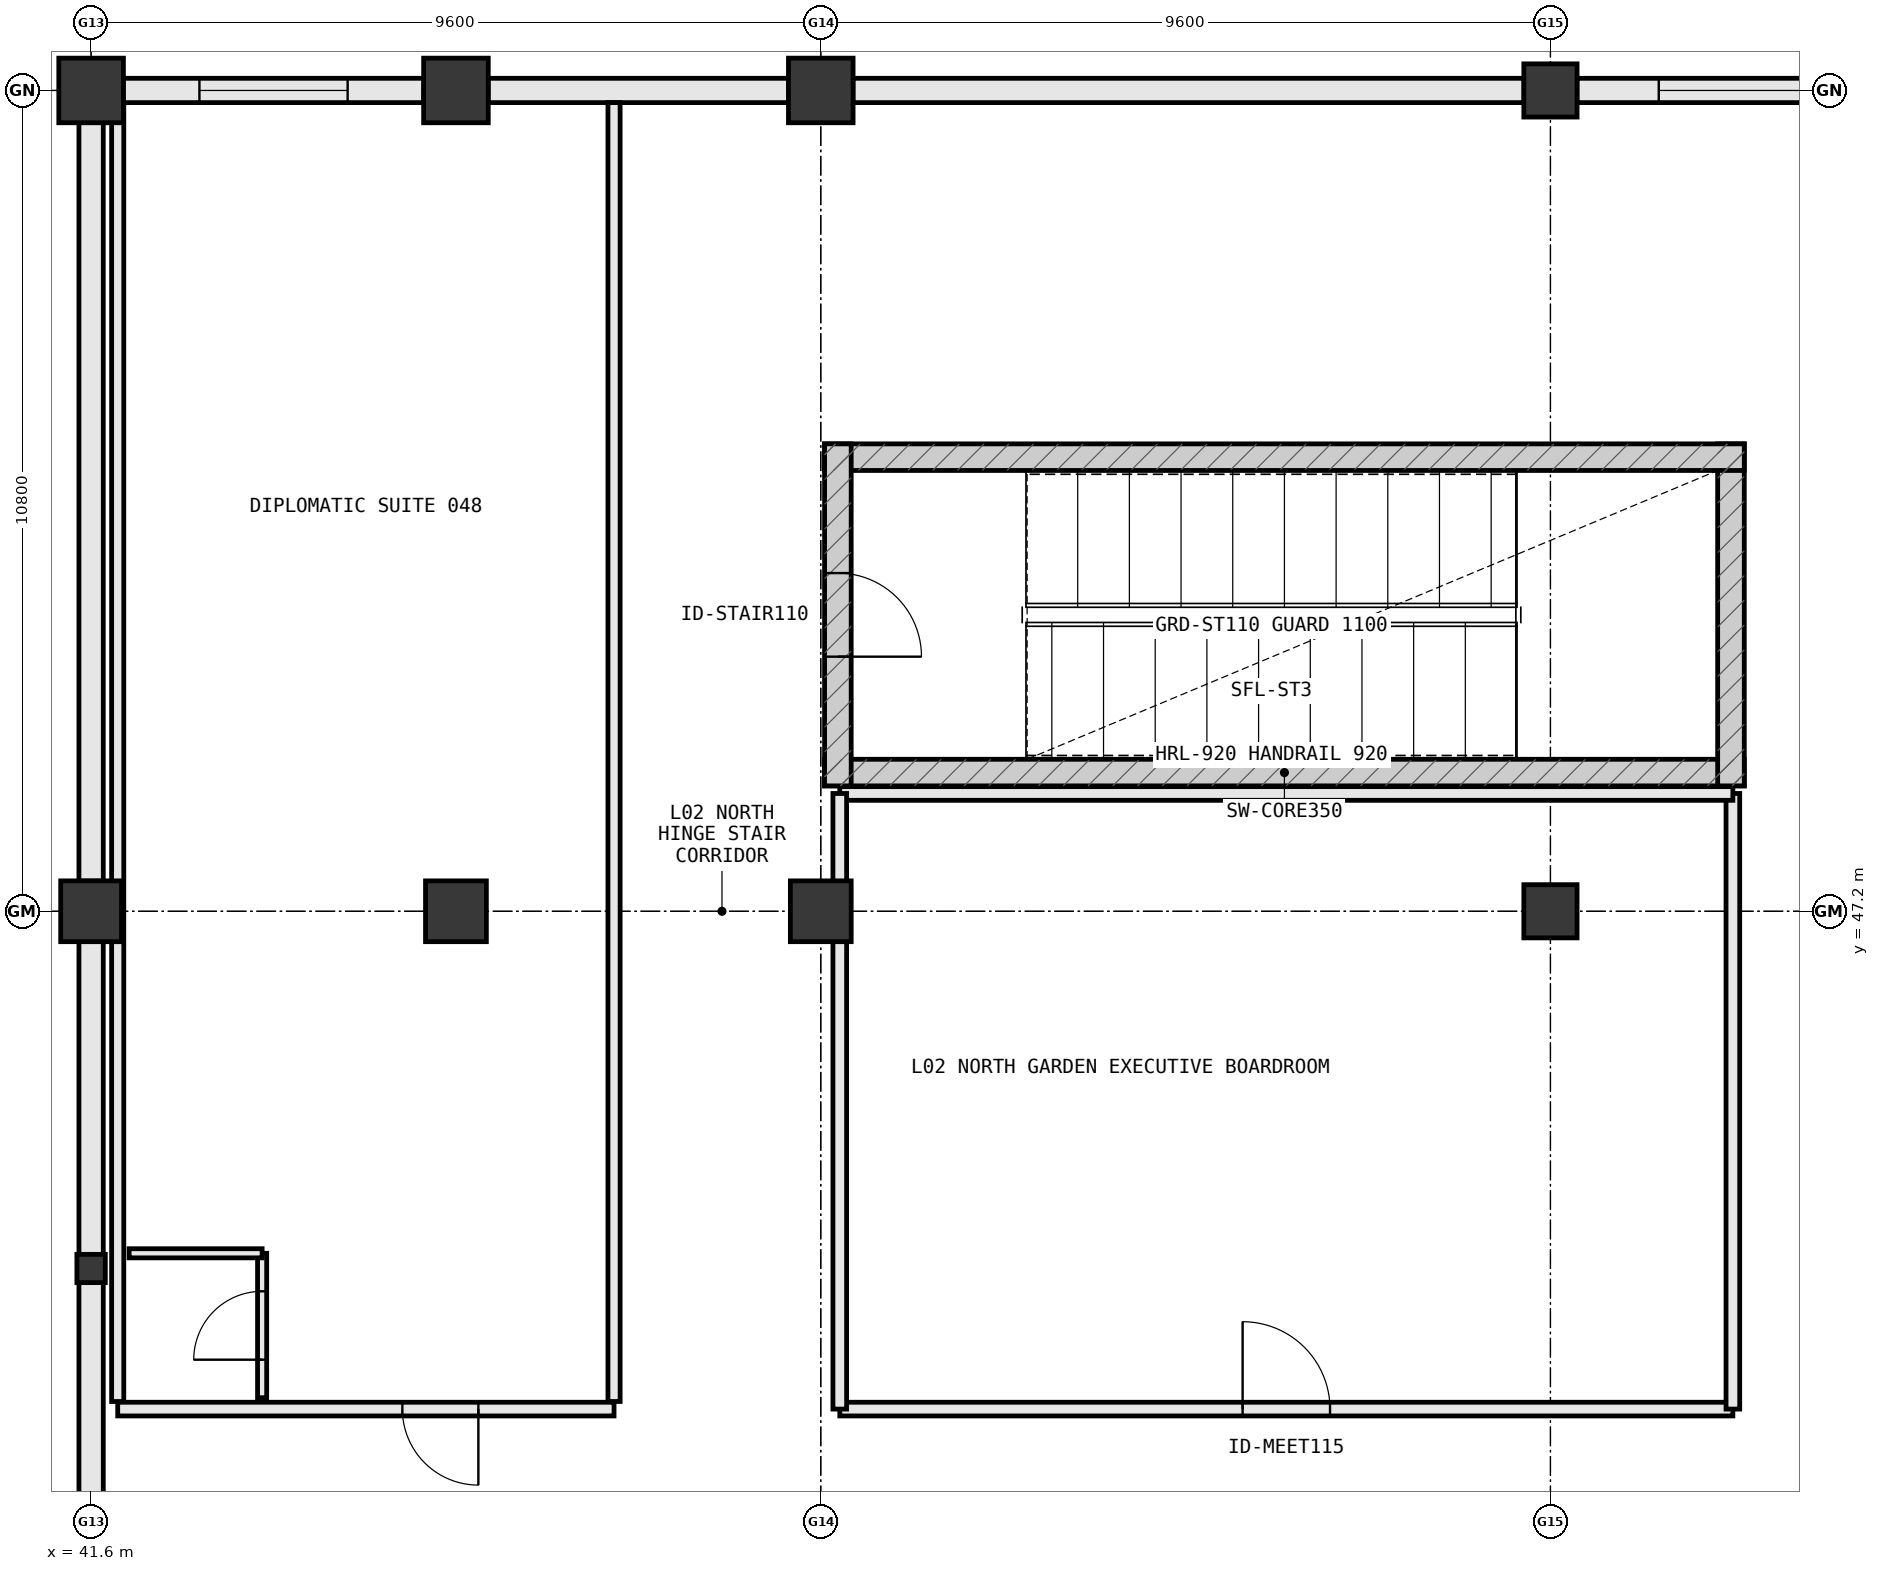
"""IFC4 building model, lengths in metres.
Left out: names, types, materials, properties, quantities, classifications, styles, units other than length and angle.
Written with IfcOpenShell. Run it as: python <this file> out.ifc"""

import sys

from ifc_helpers import new_model, si_unit, direction, frame, frame_2d, origin, origin_2d, place, context, subcontext, project, spatial, rectangle, i_section, extrude, element, fill, save


model = new_model("IFC4")
c1 = context("Model", 3, precision=1e-05, world=origin(), true_north=direction((0.0, 1.0)))
c2 = subcontext(c1, "Body", "Model", "MODEL_VIEW")
j1 = project(units=[si_unit("LENGTHUNIT", "METRE"), si_unit("PLANEANGLEUNIT", "RADIAN")], contexts=[c1])
p1 = place(None, origin())
s1 = spatial("IfcSite", under=j1, at=p1, CompositionType="ELEMENT")
p2 = place(p1, origin())
s2 = spatial("IfcBuilding", under=s1, at=p2, CompositionType="ELEMENT")
p3 = place(p2, frame((0.0, 0.0, 10.8)))
s3 = spatial("IfcBuildingStorey", under=s2, at=p3, CompositionType="ELEMENT", Elevation=10.8)
p4 = place(p3, frame((41.6, 58.0, 0.0), z_axis=(0.0, 0.0, 1.0), x_axis=(1.0, 0.0, 0.0)))
e1 = element("IfcColumn", 1, at=p4, inside=s3, PredefinedType="COLUMN", context=c2, shape_type="SweptSolid", body=[
    extrude(rectangle(XDim=0.85, YDim=0.85, at=origin_2d()), origin(), (0.0, 0.0, 1.0), 5.4),
])
p5 = place(p3, frame((41.6, 42.5, 0.0), z_axis=(0.0, 0.0, 1.0), x_axis=(1.0, 0.0, 0.0)))
e2 = element("IfcColumn", 2, at=p5, inside=s3, PredefinedType="COLUMN", context=c2, shape_type="SweptSolid", body=[
    extrude(i_section(OverallWidth=0.374, OverallDepth=0.372, WebThickness=0.016, FlangeThickness=0.026, at=origin_2d()), origin(), (0.0, 0.0, 1.0), 9.75),
])
p6 = place(p3, frame((41.6, 47.2, 0.0), z_axis=(0.0, 0.0, 1.0), x_axis=(1.0, 0.0, 0.0)))
e3 = element("IfcColumn", 3, at=p6, inside=s3, PredefinedType="COLUMN", context=c2, shape_type="SweptSolid", body=[
    extrude(rectangle(XDim=0.8, YDim=0.8, at=origin_2d()), origin(), (0.0, 0.0, 1.0), 5.4),
])
for number, where, z_axis, x_axis in (
    (4, (60.8, 47.2, 0.0), (0.0, 0.0, 1.0), (1.0, 0.0, 0.0)),
    (5, (60.8, 58.0, 0.0), (0.0, 0.0, 1.0), (1.0, 0.0, 0.0)),
):
    element("IfcColumn", number, at=place(p3, frame(where, z_axis=z_axis, x_axis=x_axis)), inside=s3, PredefinedType="COLUMN", context=c2, shape_type="SweptSolid", body=[
        extrude(rectangle(XDim=0.7, YDim=0.7, at=origin_2d()), origin(), (0.0, 0.0, 1.0), 5.4),
    ])
p7 = place(p3, frame((46.4, 47.2, 0.0), z_axis=(0.0, 0.0, 1.0), x_axis=(1.0, 0.0, 0.0)))
e6 = element("IfcColumn", 6, at=p7, inside=s3, PredefinedType="COLUMN", context=c2, shape_type="SweptSolid", body=[
    extrude(rectangle(XDim=0.8, YDim=0.8, at=origin_2d()), origin(), (0.0, 0.0, 1.0), 5.4),
])
p8 = place(p3, frame((46.4, 58.0, 0.0), z_axis=(0.0, 0.0, 1.0), x_axis=(1.0, 0.0, 0.0)))
e7 = element("IfcColumn", 7, at=p8, inside=s3, PredefinedType="COLUMN", context=c2, shape_type="SweptSolid", body=[
    extrude(rectangle(XDim=0.85, YDim=0.85, at=origin_2d()), origin(), (0.0, 0.0, 1.0), 5.4),
])
p9 = place(p3, frame((51.2, 47.2, 0.0), z_axis=(0.0, 0.0, 1.0), x_axis=(1.0, 0.0, 0.0)))
e8 = element("IfcColumn", 8, at=p9, inside=s3, PredefinedType="COLUMN", context=c2, shape_type="SweptSolid", body=[
    extrude(rectangle(XDim=0.8, YDim=0.8, at=origin_2d()), origin(), (0.0, 0.0, 1.0), 5.4),
])
p10 = place(p3, frame((51.2, 58.0, 0.0), z_axis=(0.0, 0.0, 1.0), x_axis=(1.0, 0.0, 0.0)))
e9 = element("IfcColumn", 9, at=p10, inside=s3, PredefinedType="COLUMN", context=c2, shape_type="SweptSolid", body=[
    extrude(rectangle(XDim=0.85, YDim=0.85, at=origin_2d()), origin(), (0.0, 0.0, 1.0), 5.4),
])
p11 = place(p3, frame((65.252, 58.0, 0.0), z_axis=(0.0, 0.0, 1.0), x_axis=(-1.0, 0.0, 0.0)))
e10 = element("IfcWall", 10, at=p11, inside=s3, PredefinedType="STANDARD", context=c2, shape_type="SweptSolid", body=[
    extrude(rectangle(XDim=4.104, YDim=0.32, at=frame_2d((2.052, 0.0))), origin(), (0.0, 0.0, 1.0), 4.183),
])
p12 = place(p11, frame((1.077, 0.0, 0.85)))
e11 = element("IfcOpeningElement", 11, at=p12, cuts=e10, PredefinedType="OPENING", context=c2, shape_type="SweptSolid", body=[
    extrude(rectangle(XDim=1.95, YDim=1.9, at=frame_2d((0.975, 0.95))), frame((0.0, 0.172, 0.0), z_axis=(0.0, -1.0, 0.0), x_axis=(1.0, 0.0, 0.0)), (0.0, 0.0, 1.0), 0.344),
])
p13 = place(p3, frame((60.452, 58.0, 0.0), z_axis=(0.0, 0.0, 1.0), x_axis=(-1.0, 0.0, 0.0)))
e12 = element("IfcWall", 12, at=p13, inside=s3, PredefinedType="STANDARD", context=c2, shape_type="SweptSolid", body=[
    extrude(rectangle(XDim=8.829, YDim=0.32, at=frame_2d((4.415, 0.0))), origin(), (0.0, 0.0, 1.0), 4.183),
])
p14 = place(p3, frame((50.777, 58.0, 0.0), z_axis=(0.0, 0.0, 1.0), x_axis=(-1.0, 0.0, 0.0)))
e13 = element("IfcWall", 13, at=p14, inside=s3, PredefinedType="STANDARD", context=c2, shape_type="SweptSolid", body=[
    extrude(rectangle(XDim=3.954, YDim=0.32, at=frame_2d((1.977, 0.0))), origin(), (0.0, 0.0, 1.0), 4.183),
])
p15 = place(p3, frame((45.977, 58.0, 0.0), z_axis=(0.0, 0.0, 1.0), x_axis=(-1.0, 0.0, 0.0)))
e14 = element("IfcWall", 14, at=p15, inside=s3, PredefinedType="STANDARD", context=c2, shape_type="SweptSolid", body=[
    extrude(rectangle(XDim=3.954, YDim=0.32, at=frame_2d((1.977, 0.0))), origin(), (0.0, 0.0, 1.0), 4.183),
])
p16 = place(p15, frame((1.002, 0.0, 0.85)))
e15 = element("IfcOpeningElement", 15, at=p16, cuts=e14, PredefinedType="OPENING", context=c2, shape_type="SweptSolid", body=[
    extrude(rectangle(XDim=1.95, YDim=1.9, at=frame_2d((0.975, 0.95))), frame((0.0, 0.172, 0.0), z_axis=(0.0, -1.0, 0.0), x_axis=(1.0, 0.0, 0.0)), (0.0, 0.0, 1.0), 0.344),
])
p17 = place(p3, frame((41.6, 57.577, 0.0), z_axis=(0.0, 0.0, 1.0), x_axis=(0.0, -1.0, 0.0)))
e16 = element("IfcWall", 16, at=p17, inside=s3, PredefinedType="STANDARD", context=c2, shape_type="SweptSolid", body=[
    extrude(rectangle(XDim=9.979, YDim=0.32, at=frame_2d((4.99, 0.0))), origin(), (0.0, 0.0, 1.0), 4.102),
])
p18 = place(p3, frame((41.6, 46.802, 0.0), z_axis=(0.0, 0.0, 1.0), x_axis=(0.0, -1.0, 0.0)))
e17 = element("IfcWall", 17, at=p18, inside=s3, PredefinedType="STANDARD", context=c2, shape_type="SweptSolid", body=[
    extrude(rectangle(XDim=4.118, YDim=0.32, at=frame_2d((2.059, 0.0))), origin(), (0.0, 0.0, 1.0), 4.251),
])
p19 = place(p3, frame((41.6, 42.316, 0.0), z_axis=(0.0, 0.0, 1.0), x_axis=(0.0, -1.0, 0.0)))
e18 = element("IfcWall", 18, at=p19, inside=s3, PredefinedType="STANDARD", context=c2, shape_type="SweptSolid", body=[
    extrude(rectangle(XDim=5.518, YDim=0.32, at=frame_2d((2.759, 0.0))), origin(), (0.0, 0.0, 1.0), 4.251),
])
p20 = place(p3, frame((51.25, 49.025, 0.0), z_axis=(0.0, 0.0, 1.0), x_axis=(1.0, 0.0, 0.0)))
e19 = element("IfcWall", 19, at=p20, inside=s3, PredefinedType="SHEAR", context=c2, shape_type="SweptSolid", body=[
    extrude(rectangle(XDim=12.1, YDim=0.35, at=frame_2d((6.05, 0.0))), origin(), (0.0, 0.0, 1.0), 5.4),
])
p21 = place(p3, frame((63.175, 48.85, 0.0), z_axis=(0.0, 0.0, 1.0), x_axis=(0.0, 1.0, 0.0)))
e20 = element("IfcWall", 20, at=p21, inside=s3, PredefinedType="SHEAR", context=c2, shape_type="SweptSolid", body=[
    extrude(rectangle(XDim=4.5, YDim=0.35, at=frame_2d((2.25, 0.0))), origin(), (0.0, 0.0, 1.0), 5.4),
])
p22 = place(p3, frame((63.35, 53.175, 0.0), z_axis=(0.0, 0.0, 1.0), x_axis=(-1.0, 0.0, 0.0)))
e21 = element("IfcWall", 21, at=p22, inside=s3, PredefinedType="SHEAR", context=c2, shape_type="SweptSolid", body=[
    extrude(rectangle(XDim=12.1, YDim=0.35, at=frame_2d((6.05, 0.0))), origin(), (0.0, 0.0, 1.0), 5.4),
])
p23 = place(p3, frame((51.425, 53.35, 0.0), z_axis=(0.0, 0.0, 1.0), x_axis=(0.0, -1.0, 0.0)))
e22 = element("IfcWall", 22, at=p23, inside=s3, PredefinedType="SHEAR", context=c2, shape_type="SweptSolid", body=[
    extrude(rectangle(XDim=4.5, YDim=0.35, at=frame_2d((2.25, 0.0))), origin(), (0.0, 0.0, 1.0), 5.4),
])
p24 = place(p23, frame((1.7, 0.0, 0.0)))
e23 = element("IfcOpeningElement", 23, at=p24, cuts=e22, PredefinedType="OPENING", context=c2, shape_type="SweptSolid", body=[
    extrude(rectangle(XDim=1.1, YDim=2.2, at=frame_2d((0.55, 1.1))), frame((0.0, 0.187, 0.0), z_axis=(0.0, -1.0, 0.0), x_axis=(1.0, 0.0, 0.0)), (0.0, 0.0, 1.0), 0.374),
])
p25 = place(p3, frame((51.45, 40.65, 0.0), z_axis=(0.0, 0.0, 1.0), x_axis=(1.0, 0.0, 0.0)))
e24 = element("IfcWall", 24, at=p25, inside=s3, PredefinedType="PARTITIONING", context=c2, shape_type="SweptSolid", body=[
    extrude(rectangle(XDim=11.75, YDim=0.18, at=frame_2d((5.875, 0.0))), origin(), (0.0, 0.0, 1.0), 4.8),
])
p26 = place(p25, frame((5.3, 0.0, 0.0)))
e25 = element("IfcOpeningElement", 25, at=p26, cuts=e24, PredefinedType="OPENING", context=c2, shape_type="SweptSolid", body=[
    extrude(rectangle(XDim=1.15, YDim=2.2, at=frame_2d((0.575, 1.1))), frame((0.0, 0.102, 0.0), z_axis=(0.0, -1.0, 0.0), x_axis=(1.0, 0.0, 0.0)), (0.0, 0.0, 1.0), 0.204),
])
p27 = place(p3, frame((63.2, 40.65, 0.0), z_axis=(0.0, 0.0, 1.0), x_axis=(0.0, 1.0, 0.0)))
e26 = element("IfcWall", 26, at=p27, inside=s3, PredefinedType="PARTITIONING", context=c2, shape_type="SweptSolid", body=[
    extrude(rectangle(XDim=8.1, YDim=0.18, at=frame_2d((4.05, 0.0))), origin(), (0.0, 0.0, 1.0), 4.8),
])
p28 = place(p3, frame((63.2, 48.75, 0.0), z_axis=(0.0, 0.0, 1.0), x_axis=(-1.0, 0.0, 0.0)))
e27 = element("IfcWall", 27, at=p28, inside=s3, PredefinedType="PARTITIONING", context=c2, shape_type="SweptSolid", body=[
    extrude(rectangle(XDim=11.75, YDim=0.18, at=frame_2d((5.875, 0.0))), origin(), (0.0, 0.0, 1.0), 4.8),
])
p29 = place(p3, frame((51.45, 48.75, 0.0), z_axis=(0.0, 0.0, 1.0), x_axis=(0.0, -1.0, 0.0)))
e28 = element("IfcWall", 28, at=p29, inside=s3, PredefinedType="PARTITIONING", context=c2, shape_type="SweptSolid", body=[
    extrude(rectangle(XDim=8.1, YDim=0.18, at=frame_2d((4.05, 0.0))), origin(), (0.0, 0.0, 1.0), 4.155),
])
p30 = place(p3, frame((41.95, 40.65, 0.0), z_axis=(0.0, 0.0, 1.0), x_axis=(1.0, 0.0, 0.0)))
e29 = element("IfcWall", 29, at=p30, inside=s3, PredefinedType="PARTITIONING", context=c2, shape_type="SweptSolid", body=[
    extrude(rectangle(XDim=6.53, YDim=0.18, at=frame_2d((3.265, 0.0))), origin(), (0.0, 0.0, 1.0), 4.8),
])
p31 = place(p30, frame((3.745, 0.0, 0.0)))
e30 = element("IfcOpeningElement", 30, at=p31, cuts=e29, PredefinedType="OPENING", context=c2, shape_type="SweptSolid", body=[
    extrude(rectangle(XDim=1.0, YDim=2.2, at=frame_2d((0.5, 1.1))), frame((0.0, 0.102, 0.0), z_axis=(0.0, -1.0, 0.0), x_axis=(1.0, 0.0, 0.0)), (0.0, 0.0, 1.0), 0.204),
])
p32 = place(p3, frame((41.95, 40.75, 0.0), z_axis=(0.0, 0.0, 1.0), x_axis=(0.0, 1.0, 0.0)))
e31 = element("IfcWall", 31, at=p32, inside=s3, PredefinedType="PARTITIONING", context=c2, shape_type="SweptSolid", body=[
    extrude(rectangle(XDim=17.09, YDim=0.16, at=frame_2d((8.545, 0.0))), origin(), (0.0, 0.0, 1.0), 4.102),
])
p33 = place(p3, frame((48.48, 40.75, 0.0), z_axis=(0.0, 0.0, 1.0), x_axis=(0.0, 1.0, 0.0)))
e32 = element("IfcWall", 32, at=p33, inside=s3, PredefinedType="PARTITIONING", context=c2, shape_type="SweptSolid", body=[
    extrude(rectangle(XDim=17.09, YDim=0.16, at=frame_2d((8.545, 0.0))), origin(), (0.0, 0.0, 1.0), 4.378),
])
p34 = place(p3, frame((43.85, 40.8, 0.0), z_axis=(0.0, 0.0, 1.0), x_axis=(0.0, 1.0, 0.0)))
e33 = element("IfcWall", 33, at=p34, inside=s3, PredefinedType="PARTITIONING", context=c2, shape_type="SweptSolid", body=[
    extrude(rectangle(XDim=1.9, YDim=0.12, at=frame_2d((0.95, 0.0))), origin(), (0.0, 0.0, 1.0), 4.378),
])
p35 = place(p34, frame((0.5, 0.0, 0.0)))
e34 = element("IfcOpeningElement", 34, at=p35, cuts=e33, PredefinedType="OPENING", context=c2, shape_type="SweptSolid", body=[
    extrude(rectangle(XDim=0.9, YDim=2.15, at=frame_2d((0.45, 1.075))), frame((0.0, 0.072, 0.0), z_axis=(0.0, -1.0, 0.0), x_axis=(1.0, 0.0, 0.0)), (0.0, 0.0, 1.0), 0.144),
])
p36 = place(p3, frame((42.1, 42.7, 0.0), z_axis=(0.0, 0.0, 1.0), x_axis=(1.0, 0.0, 0.0)))
e35 = element("IfcWall", 35, at=p36, inside=s3, PredefinedType="PARTITIONING", context=c2, shape_type="SweptSolid", body=[
    extrude(rectangle(XDim=1.75, YDim=0.12, at=frame_2d((0.875, 0.0))), origin(), (0.0, 0.0, 1.0), 4.8),
])
p37 = place(p12, origin())
e36 = element("IfcWindow", 36, at=p37, inside=s3, PartitioningType="DOUBLE_PANEL_VERTICAL", PredefinedType="WINDOW", context=c2, shape_type="SweptSolid", body=[
    extrude(rectangle(XDim=1.95, YDim=1.9, at=frame_2d((0.975, 0.95))), frame((0.0, 0.03, 0.0), z_axis=(0.0, -1.0, 0.0), x_axis=(1.0, 0.0, 0.0)), (0.0, 0.0, 1.0), 0.06),
])
fill(e11, e36)
p38 = place(p16, origin())
e37 = element("IfcWindow", 37, at=p38, inside=s3, PartitioningType="DOUBLE_PANEL_VERTICAL", PredefinedType="WINDOW", context=c2, shape_type="SweptSolid", body=[
    extrude(rectangle(XDim=1.95, YDim=1.9, at=frame_2d((0.975, 0.95))), frame((0.0, 0.03, 0.0), z_axis=(0.0, -1.0, 0.0), x_axis=(1.0, 0.0, 0.0)), (0.0, 0.0, 1.0), 0.06),
])
fill(e15, e37)
p39 = place(p24, origin())
e38 = element("IfcDoor", 38, at=p39, inside=s3, OperationType="SINGLE_SWING_RIGHT", PredefinedType="DOOR", context=c2, shape_type="SweptSolid", body=[
    extrude(rectangle(XDim=1.1, YDim=2.2, at=frame_2d((0.55, 1.1))), frame((0.0, 0.025, 0.0), z_axis=(0.0, -1.0, 0.0), x_axis=(1.0, 0.0, 0.0)), (0.0, 0.0, 1.0), 0.05),
])
fill(e23, e38)
p40 = place(p26, origin())
e39 = element("IfcDoor", 39, at=p40, inside=s3, OperationType="SINGLE_SWING_LEFT", PredefinedType="DOOR", context=c2, shape_type="SweptSolid", body=[
    extrude(rectangle(XDim=1.15, YDim=2.2, at=frame_2d((0.575, 1.1))), frame((0.0, 0.025, 0.0), z_axis=(0.0, -1.0, 0.0), x_axis=(1.0, 0.0, 0.0)), (0.0, 0.0, 1.0), 0.05),
])
fill(e25, e39)
p41 = place(p31, frame((1.0, 0.0, 0.0), z_axis=(0.0, 0.0, 1.0), x_axis=(-1.0, 0.0, 0.0)))
e40 = element("IfcDoor", 40, at=p41, inside=s3, OperationType="SINGLE_SWING_RIGHT", PredefinedType="DOOR", context=c2, shape_type="SweptSolid", body=[
    extrude(rectangle(XDim=1.0, YDim=2.2, at=frame_2d((0.5, 1.1))), frame((0.0, 0.025, 0.0), z_axis=(0.0, -1.0, 0.0), x_axis=(1.0, 0.0, 0.0)), (0.0, 0.0, 1.0), 0.05),
])
fill(e30, e40)
p42 = place(p35, origin())
e41 = element("IfcDoor", 41, at=p42, inside=s3, OperationType="SINGLE_SWING_LEFT", PredefinedType="DOOR", context=c2, shape_type="SweptSolid", body=[
    extrude(rectangle(XDim=0.9, YDim=2.15, at=frame_2d((0.45, 1.075))), frame((0.0, 0.025, 0.0), z_axis=(0.0, -1.0, 0.0), x_axis=(1.0, 0.0, 0.0)), (0.0, 0.0, 1.0), 0.05),
])
fill(e34, e41)
save(model, sys.argv[1])
